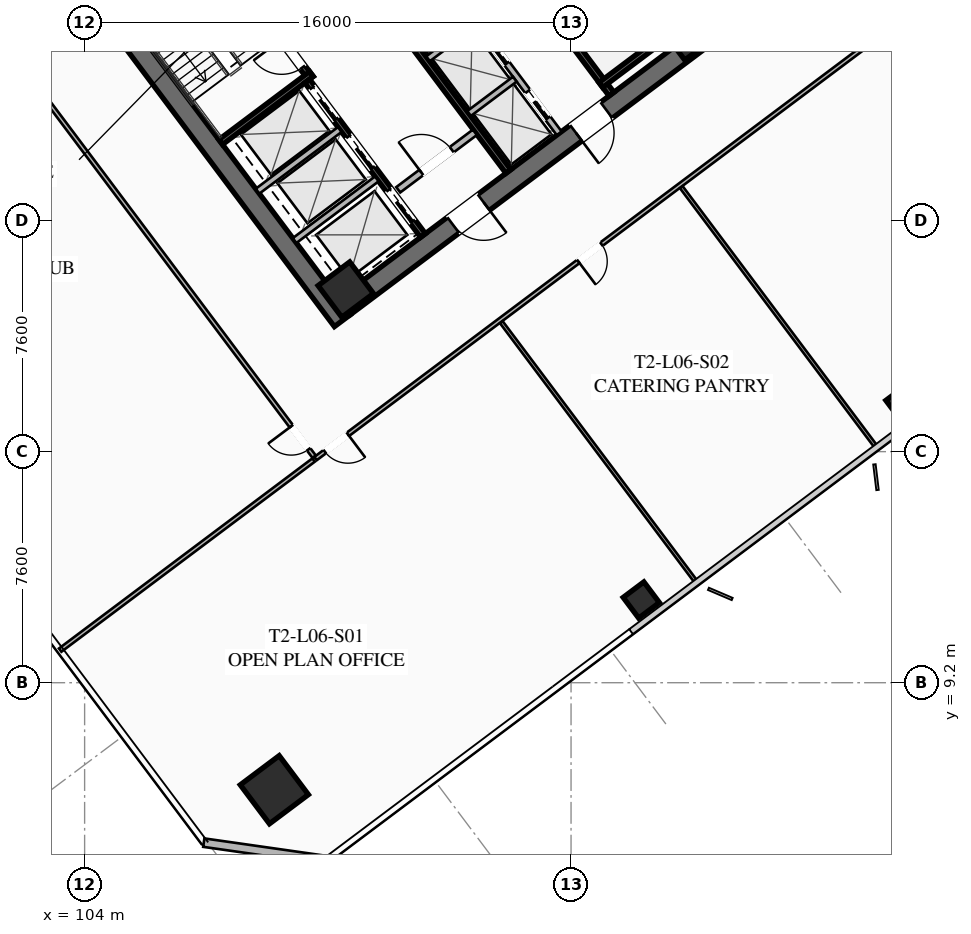
"""IFC4 building model, lengths in metres.
Left out: names, types, materials, properties, quantities, classifications, styles, units other than length and angle.
Written with IfcOpenShell. Run it as: python <this file> out.ifc"""

import sys

from ifc_helpers import new_model, si_unit, direction, frame, frame_2d, origin, origin_2d, place, context, subcontext, project, spatial, rectangle, hollow_rectangle, extrude, element, fill, save


model = new_model("IFC4")
c1 = context("Model", 3, precision=1e-05, world=origin(), true_north=direction((0.0, 1.0)))
c2 = subcontext(c1, "Body", "Model", "MODEL_VIEW")
j1 = project(units=[si_unit("LENGTHUNIT", "METRE"), si_unit("PLANEANGLEUNIT", "RADIAN")], contexts=[c1])
p1 = place(None, origin())
s1 = spatial("IfcSite", under=j1, at=p1, CompositionType="ELEMENT")
p2 = place(p1, origin())
s2 = spatial("IfcBuilding", under=s1, at=p2, CompositionType="ELEMENT")
p3 = place(p2, frame((0.0, 0.0, 28.15)))
s3 = spatial("IfcBuildingStorey", under=s2, at=p3, CompositionType="ELEMENT", Elevation=28.15)
p4 = place(p3, frame((112.476, 21.107, 0.0), z_axis=(0.0, 0.0, 1.0), x_axis=(-0.600005007985, 0.799996243986, 0.0)))
e1 = element("IfcWall", 1, at=p4, inside=s3, PredefinedType="SHEAR", context=c2, shape_type="SweptSolid", body=[
    extrude(rectangle(XDim=15.6, YDim=0.65, at=frame_2d((7.8, 0.0))), origin(), (0.0, 0.0, 1.0), 3.55),
])
p5 = place(p3, frame((124.429, 30.478, 0.0), z_axis=(0.0, 0.0, 1.0), x_axis=(-0.799998028465, -0.600002628705, 0.0)))
e2 = element("IfcWall", 2, at=p5, inside=s3, PredefinedType="SHEAR", context=c2, shape_type="SweptSolid", body=[
    extrude(rectangle(XDim=14.86, YDim=0.65, at=frame_2d((7.43, 0.0))), origin(), (0.0, 0.0, 1.0), 3.55),
])
p6 = place(p5, frame((9.13, 0.0, 0.0)))
e3 = element("IfcOpeningElement", 3, at=p6, cuts=e2, PredefinedType="OPENING", context=c2, shape_type="SweptSolid", body=[
    extrude(rectangle(XDim=1.25, YDim=2.25, at=frame_2d((0.625, 1.125))), frame((0.0, 0.335, 0.0), z_axis=(0.0, -1.0, 0.0), x_axis=(1.0, 0.0, 0.0)), (0.0, 0.0, 1.0), 0.67),
])
p7 = place(p5, frame((4.08, 0.0, 0.0)))
e4 = element("IfcOpeningElement", 4, at=p7, cuts=e2, PredefinedType="OPENING", context=c2, shape_type="SweptSolid", body=[
    extrude(rectangle(XDim=1.25, YDim=2.25, at=frame_2d((0.625, 1.125))), frame((0.0, 0.335, 0.0), z_axis=(0.0, -1.0, 0.0), x_axis=(1.0, 0.0, 0.0)), (0.0, 0.0, 1.0), 0.67),
])
for number, where, z_axis, x_axis in (
    (5, (112.59, 22.13, 0.0), (0.0, 0.0, 1.0), (0.8, 0.6, 0.0)),
    (6, (123.87, 30.59, 0.0), (0.0, 0.0, 1.0), (0.8, 0.6, 0.0)),
):
    element("IfcColumn", number, at=place(p3, frame(where, z_axis=z_axis, x_axis=x_axis)), inside=s3, PredefinedType="COLUMN", context=c2, shape_type="SweptSolid", body=[
        extrude(hollow_rectangle(XDim=1.3, YDim=1.3, WallThickness=0.05, at=origin_2d()), origin(), (0.0, 0.0, 1.0), 3.35),
    ])
p8 = place(p3, frame((110.24, 5.68, 0.0), z_axis=(0.0, 0.0, 1.0), x_axis=(0.799999996291, 0.600000004945, 0.0)))
e7 = element("IfcColumn", 7, at=p8, inside=s3, PredefinedType="COLUMN", context=c2, shape_type="SweptSolid", body=[
    extrude(hollow_rectangle(XDim=1.6, YDim=1.6, WallThickness=0.06, at=origin_2d()), origin(), (0.0, 0.0, 1.0), 3.35),
])
for number, where, z_axis, x_axis in (
    (8, (122.31, 11.92, 0.0), (0.0, 0.0, 1.0), (0.8, 0.6, 0.0)),
    (9, (130.95, 18.4, 0.0), (0.0, 0.0, 1.0), (0.8, 0.6, 0.0)),
):
    element("IfcColumn", number, at=place(p3, frame(where, z_axis=z_axis, x_axis=x_axis)), inside=s3, PredefinedType="COLUMN", context=c2, shape_type="SweptSolid", body=[
        extrude(hollow_rectangle(XDim=0.85, YDim=0.85, WallThickness=0.035, at=origin_2d()), origin(), (0.0, 0.0, 1.0), 3.35),
    ])
p9 = place(p3, frame((111.98, 3.36, 0.0), z_axis=(0.0, 0.0, 1.0), x_axis=(-0.989955445613, 0.14137968631, 0.0)))
e10 = element("IfcWall", 10, at=p9, inside=s3, PredefinedType="SOLIDWALL", context=c2, shape_type="SweptSolid", body=[
    extrude(rectangle(XDim=4.101, YDim=0.28, at=frame_2d((2.051, 0.0))), origin(), (0.0, 0.0, 1.0), 3.35),
])
p10 = place(p3, frame((111.44, 29.08, 0.0), z_axis=(0.0, 0.0, 1.0), x_axis=(-0.600009827119, 0.799992629566, 0.0)))
e11 = element("IfcWall", 11, at=p10, inside=s3, PredefinedType="SHEAR", context=c2, shape_type="SweptSolid", body=[
    extrude(rectangle(XDim=7.95, YDim=0.2, at=frame_2d((3.975, 0.0))), origin(), (0.0, 0.0, 1.0), 3.35),
])
p11 = place(p10, frame((0.45, 0.0, 0.0)))
e12 = element("IfcOpeningElement", 12, at=p11, cuts=e11, PredefinedType="OPENING", context=c2, shape_type="SweptSolid", body=[
    extrude(rectangle(XDim=1.15, YDim=2.2, at=frame_2d((0.575, 1.1))), frame((0.0, 0.11, 0.0), z_axis=(0.0, -1.0, 0.0), x_axis=(1.0, 0.0, 0.0)), (0.0, 0.0, 1.0), 0.22),
])
p12 = place(p3, frame((108.476, 26.982, 0.0), z_axis=(0.0, 0.0, 1.0), x_axis=(0.799984290658, 0.600020945218, 0.0)))
e13 = element("IfcWall", 13, at=p12, inside=s3, PredefinedType="SHEAR", context=c2, shape_type="SweptSolid", body=[
    extrude(rectangle(XDim=3.73, YDim=0.2, at=frame_2d((1.865, 0.0))), origin(), (0.0, 0.0, 1.0), 3.35),
])
p13 = place(p3, frame((116.56, 34.92, 0.0), z_axis=(0.0, 0.0, 1.0), x_axis=(0.600009827119, -0.799992629566, 0.0)))
e14 = element("IfcWall", 14, at=p13, inside=s3, PredefinedType="SHEAR", context=c2, shape_type="SweptSolid", body=[
    extrude(rectangle(XDim=7.95, YDim=0.2, at=frame_2d((3.975, 0.0))), origin(), (0.0, 0.0, 1.0), 3.35),
])
p14 = place(p13, frame((0.45, 0.0, 0.0)))
e15 = element("IfcOpeningElement", 15, at=p14, cuts=e14, PredefinedType="OPENING", context=c2, shape_type="SweptSolid", body=[
    extrude(rectangle(XDim=1.15, YDim=2.2, at=frame_2d((0.575, 1.1))), frame((0.0, 0.11, 0.0), z_axis=(0.0, -1.0, 0.0), x_axis=(1.0, 0.0, 0.0)), (0.0, 0.0, 1.0), 0.22),
])
p15 = place(p3, frame((120.98, 28.86, 0.0), z_axis=(0.0, 0.0, 1.0), x_axis=(0.800039270442, 0.59994763584, 0.0)))
e16 = element("IfcWall", 16, at=p15, inside=s3, PredefinedType="SHEAR", context=c2, shape_type="SweptSolid", body=[
    extrude(rectangle(XDim=3.73, YDim=0.2, at=frame_2d((1.865, 0.0))), origin(), (0.0, 0.0, 1.0), 3.35),
])
p16 = place(p3, frame((117.938, 26.016, 0.0), z_axis=(0.0, 0.0, 1.0), x_axis=(-0.600005463273, 0.799995902516, 0.0)))
e17 = element("IfcWall", 17, at=p16, inside=s3, PredefinedType="SHEAR", context=c2, shape_type="SweptSolid", body=[
    extrude(rectangle(XDim=14.3, YDim=0.2, at=frame_2d((7.15, 0.0))), origin(), (0.0, 0.0, 1.0), 3.35),
])
p17 = place(p3, frame((114.316, 25.412, 0.0), z_axis=(0.0, 0.0, 1.0), x_axis=(0.800018601094, 0.59997519774, 0.0)))
e18 = element("IfcWall", 18, at=p17, inside=s3, PredefinedType="SOLIDWALL", context=c2, shape_type="SweptSolid", body=[
    extrude(rectangle(XDim=3.15, YDim=0.22, at=frame_2d((1.575, 0.0))), origin(), (0.0, 0.0, 1.0), 2.703),
])
p18 = place(p17, frame((0.95, 0.0, 0.0)))
e19 = element("IfcOpeningElement", 19, at=p18, cuts=e18, PredefinedType="OPENING", context=c2, shape_type="SweptSolid", body=[
    extrude(rectangle(XDim=1.25, YDim=2.25, at=frame_2d((0.625, 1.125))), frame((0.0, 0.12, 0.0), z_axis=(0.0, -1.0, 0.0), x_axis=(1.0, 0.0, 0.0)), (0.0, 0.0, 1.0), 0.24),
])
p19 = place(p3, frame((115.13, 23.91, 0.0), z_axis=(0.0, 0.0, 1.0), x_axis=(-0.599975393228, 0.800018454488, 0.0)))
e20 = element("IfcWall", 20, at=p19, inside=s3, PredefinedType="SHEAR", context=c2, shape_type="SweptSolid", body=[
    extrude(rectangle(XDim=6.35, YDim=0.2, at=frame_2d((3.175, 0.0))), origin(), (0.0, 0.0, 1.0), 3.35),
])
p20 = place(p19, frame((4.775, 0.0, 0.0)))
e21 = element("IfcOpeningElement", 21, at=p20, cuts=e20, PredefinedType="OPENING", context=c2, shape_type="SweptSolid", body=[
    extrude(rectangle(XDim=1.3, YDim=2.25, at=frame_2d((0.65, 1.125))), frame((0.0, 0.11, 0.0), z_axis=(0.0, -1.0, 0.0), x_axis=(1.0, 0.0, 0.0)), (0.0, 0.0, 1.0), 0.22),
])
p21 = place(p19, frame((2.775, 0.0, 0.0)))
e22 = element("IfcOpeningElement", 22, at=p21, cuts=e20, PredefinedType="OPENING", context=c2, shape_type="SweptSolid", body=[
    extrude(rectangle(XDim=1.3, YDim=2.25, at=frame_2d((0.65, 1.125))), frame((0.0, 0.11, 0.0), z_axis=(0.0, -1.0, 0.0), x_axis=(1.0, 0.0, 0.0)), (0.0, 0.0, 1.0), 0.22),
])
p22 = place(p19, frame((0.575, 0.0, 0.0)))
e23 = element("IfcOpeningElement", 23, at=p22, cuts=e20, PredefinedType="OPENING", context=c2, shape_type="SweptSolid", body=[
    extrude(rectangle(XDim=1.3, YDim=2.25, at=frame_2d((0.65, 1.125))), frame((0.0, 0.11, 0.0), z_axis=(0.0, -1.0, 0.0), x_axis=(1.0, 0.0, 0.0)), (0.0, 0.0, 1.0), 0.22),
])
for number, where, z_axis, x_axis in (
    (24, (110.906, 23.742, 0.0), (0.0, 0.0, 1.0), (0.8, 0.6, 0.0)),
    (25, (109.688, 25.366, 0.0), (0.0, 0.0, 1.0), (0.8, 0.6, 0.0)),
):
    element("IfcWall", number, at=place(p3, frame(where, z_axis=z_axis, x_axis=x_axis)), inside=s3, PredefinedType="SOLIDWALL", context=c2, shape_type="SweptSolid", body=[
        extrude(rectangle(XDim=3.38, YDim=0.2, at=frame_2d((1.69, 0.0))), origin(), (0.0, 0.0, 1.0), 3.35),
    ])
p23 = place(p3, frame((119.61, 27.27, 0.0), z_axis=(0.0, 0.0, 1.0), x_axis=(-0.600011488909, 0.79999138319, 0.0)))
e26 = element("IfcWall", 26, at=p23, inside=s3, PredefinedType="SOLIDWALL", context=c2, shape_type="SweptSolid", body=[
    extrude(rectangle(XDim=6.8, YDim=0.2, at=frame_2d((3.4, 0.0))), origin(), (0.0, 0.0, 1.0), 3.35),
])
p24 = place(p23, frame((0.625, 0.0, 0.0)))
e27 = element("IfcOpeningElement", 27, at=p24, cuts=e26, PredefinedType="OPENING", context=c2, shape_type="SweptSolid", body=[
    extrude(rectangle(XDim=1.1, YDim=2.2, at=frame_2d((0.55, 1.1))), frame((0.0, 0.11, 0.0), z_axis=(0.0, -1.0, 0.0), x_axis=(1.0, 0.0, 0.0)), (0.0, 0.0, 1.0), 0.22),
])
p25 = place(p23, frame((2.875, 0.0, 0.0)))
e28 = element("IfcOpeningElement", 28, at=p25, cuts=e26, PredefinedType="OPENING", context=c2, shape_type="SweptSolid", body=[
    extrude(rectangle(XDim=1.1, YDim=2.2, at=frame_2d((0.55, 1.1))), frame((0.0, 0.11, 0.0), z_axis=(0.0, -1.0, 0.0), x_axis=(1.0, 0.0, 0.0)), (0.0, 0.0, 1.0), 0.22),
])
p26 = place(p23, frame((5.125, 0.0, 0.0)))
e29 = element("IfcOpeningElement", 29, at=p26, cuts=e26, PredefinedType="OPENING", context=c2, shape_type="SweptSolid", body=[
    extrude(rectangle(XDim=1.1, YDim=2.2, at=frame_2d((0.55, 1.1))), frame((0.0, 0.11, 0.0), z_axis=(0.0, -1.0, 0.0), x_axis=(1.0, 0.0, 0.0)), (0.0, 0.0, 1.0), 0.22),
])
p27 = place(p3, frame((116.646, 27.922, 0.0), z_axis=(0.0, 0.0, 1.0), x_axis=(0.8, 0.6, 0.0)))
e30 = element("IfcWall", 30, at=p27, inside=s3, PredefinedType="SOLIDWALL", context=c2, shape_type="SweptSolid", body=[
    extrude(rectangle(XDim=1.88, YDim=0.2, at=frame_2d((0.94, 0.0))), origin(), (0.0, 0.0, 1.0), 3.35),
])
p28 = place(p3, frame((115.296, 29.722, 0.0), z_axis=(0.0, 0.0, 1.0), x_axis=(0.799984418148, 0.600020775241, 0.0)))
e31 = element("IfcWall", 31, at=p28, inside=s3, PredefinedType="SOLIDWALL", context=c2, shape_type="SweptSolid", body=[
    extrude(rectangle(XDim=1.88, YDim=0.2, at=frame_2d((0.94, 0.0))), origin(), (0.0, 0.0, 1.0), 3.35),
])
p29 = place(p3, frame((135.46, 34.47, 0.0), z_axis=(0.0, 0.0, 1.0), x_axis=(-0.800000982127, -0.599998690494, 0.0)))
e32 = element("IfcWall", 32, at=p29, inside=s3, PredefinedType="PARTITIONING", context=c2, shape_type="SweptSolid", body=[
    extrude(rectangle(XDim=29.83, YDim=0.135, at=frame_2d((14.915, 0.0))), origin(), (0.0, 0.0, 1.0), 2.703),
])
p30 = place(p29, frame((28.5, 0.0, 0.0)))
e33 = element("IfcOpeningElement", 33, at=p30, cuts=e32, PredefinedType="OPENING", context=c2, shape_type="SweptSolid", body=[
    extrude(rectangle(XDim=0.95, YDim=2.05, at=frame_2d((0.475, 1.025))), frame((0.0, 0.077, 0.0), z_axis=(0.0, -1.0, 0.0), x_axis=(1.0, 0.0, 0.0)), (0.0, 0.0, 1.0), 0.155),
])
p31 = place(p29, frame((18.075, 0.0, 0.0)))
e34 = element("IfcOpeningElement", 34, at=p31, cuts=e32, PredefinedType="OPENING", context=c2, shape_type="SweptSolid", body=[
    extrude(rectangle(XDim=0.95, YDim=2.05, at=frame_2d((0.475, 1.025))), frame((0.0, 0.077, 0.0), z_axis=(0.0, -1.0, 0.0), x_axis=(1.0, 0.0, 0.0)), (0.0, 0.0, 1.0), 0.155),
])
p32 = place(p29, frame((0.38, 0.0, 0.0)))
e35 = element("IfcOpeningElement", 35, at=p32, cuts=e32, PredefinedType="OPENING", context=c2, shape_type="SweptSolid", body=[
    extrude(rectangle(XDim=0.95, YDim=2.05, at=frame_2d((0.475, 1.025))), frame((0.0, 0.077, 0.0), z_axis=(0.0, -1.0, 0.0), x_axis=(1.0, 0.0, 0.0)), (0.0, 0.0, 1.0), 0.155),
])
p33 = place(p3, frame((124.128, 12.496, 0.0), z_axis=(0.0, 0.0, 1.0), x_axis=(-0.600003650761, 0.799997261916, 0.0)))
e36 = element("IfcWall", 36, at=p33, inside=s3, PredefinedType="PARTITIONING", context=c2, shape_type="SweptSolid", body=[
    extrude(rectangle(XDim=10.7, YDim=0.11, at=frame_2d((5.35, 0.0))), origin(), (0.0, 0.0, 1.0), 2.703),
])
p34 = place(p3, frame((130.048, 16.936, 0.0), z_axis=(0.0, 0.0, 1.0), x_axis=(-0.600007301277, 0.79999452399, 0.0)))
e37 = element("IfcWall", 37, at=p34, inside=s3, PredefinedType="PARTITIONING", context=c2, shape_type="SweptSolid", body=[
    extrude(rectangle(XDim=10.7, YDim=0.11, at=frame_2d((5.35, 0.0))), origin(), (0.0, 0.0, 1.0), 2.703),
])
p35 = place(p3, frame((111.548, 16.636, 0.0), z_axis=(0.0, 0.0, 1.0), x_axis=(-0.600003610192, 0.799997292343, 0.0)))
e38 = element("IfcWall", 38, at=p35, inside=s3, PredefinedType="PARTITIONING", context=c2, shape_type="SweptSolid", body=[
    extrude(rectangle(XDim=21.64, YDim=0.135, at=frame_2d((10.82, 0.0))), origin(), (0.0, 0.0, 1.0), 2.703),
])
p36 = place(p35, frame((0.3, 0.0, 0.0)))
e39 = element("IfcOpeningElement", 39, at=p36, cuts=e38, PredefinedType="OPENING", context=c2, shape_type="SweptSolid", body=[
    extrude(rectangle(XDim=0.95, YDim=2.05, at=frame_2d((0.475, 1.025))), frame((0.0, 0.077, 0.0), z_axis=(0.0, -1.0, 0.0), x_axis=(1.0, 0.0, 0.0)), (0.0, 0.0, 1.0), 0.155),
])
p37 = place(p3, frame((103.196, 10.272, 0.0), z_axis=(0.0, 0.0, 1.0), x_axis=(0.8, 0.6, 0.0)))
e40 = element("IfcWall", 40, at=p37, inside=s3, PredefinedType="PARTITIONING", context=c2, shape_type="SweptSolid", body=[
    extrude(rectangle(XDim=10.42, YDim=0.135, at=frame_2d((5.21, 0.0))), origin(), (0.0, 0.0, 1.0), 2.703),
])
p38 = place(p6, origin())
e41 = element("IfcDoor", 41, at=p38, inside=s3, OperationType="SINGLE_SWING_LEFT", PredefinedType="DOOR", context=c2, shape_type="SweptSolid", body=[
    extrude(rectangle(XDim=1.25, YDim=2.25, at=frame_2d((0.625, 1.125))), frame((0.0, 0.025, 0.0), z_axis=(0.0, -1.0, 0.0), x_axis=(1.0, 0.0, 0.0)), (0.0, 0.0, 1.0), 0.05),
])
fill(e3, e41)
p39 = place(p7, origin())
e42 = element("IfcDoor", 42, at=p39, inside=s3, OperationType="SINGLE_SWING_RIGHT", PredefinedType="DOOR", context=c2, shape_type="SweptSolid", body=[
    extrude(rectangle(XDim=1.25, YDim=2.25, at=frame_2d((0.625, 1.125))), frame((0.0, 0.025, 0.0), z_axis=(0.0, -1.0, 0.0), x_axis=(1.0, 0.0, 0.0)), (0.0, 0.0, 1.0), 0.05),
])
fill(e4, e42)
p40 = place(p11, origin())
e43 = element("IfcDoor", 43, at=p40, inside=s3, OperationType="SINGLE_SWING_RIGHT", PredefinedType="DOOR", context=c2, shape_type="SweptSolid", body=[
    extrude(rectangle(XDim=1.15, YDim=2.2, at=frame_2d((0.575, 1.1))), frame((0.0, 0.025, 0.0), z_axis=(0.0, -1.0, 0.0), x_axis=(1.0, 0.0, 0.0)), (0.0, 0.0, 1.0), 0.05),
])
fill(e12, e43)
p41 = place(p18, origin())
e44 = element("IfcDoor", 44, at=p41, inside=s3, OperationType="SINGLE_SWING_LEFT", PredefinedType="DOOR", context=c2, shape_type="SweptSolid", body=[
    extrude(rectangle(XDim=1.25, YDim=2.25, at=frame_2d((0.625, 1.125))), frame((0.0, 0.025, 0.0), z_axis=(0.0, -1.0, 0.0), x_axis=(1.0, 0.0, 0.0)), (0.0, 0.0, 1.0), 0.05),
])
fill(e19, e44)
p42 = place(p30, origin())
e45 = element("IfcDoor", 45, at=p42, inside=s3, OperationType="SINGLE_SWING_LEFT", PredefinedType="DOOR", context=c2, shape_type="SweptSolid", body=[
    extrude(rectangle(XDim=0.95, YDim=2.05, at=frame_2d((0.475, 1.025))), frame((0.0, 0.025, 0.0), z_axis=(0.0, -1.0, 0.0), x_axis=(1.0, 0.0, 0.0)), (0.0, 0.0, 1.0), 0.05),
])
fill(e33, e45)
p43 = place(p31, origin())
e46 = element("IfcDoor", 46, at=p43, inside=s3, OperationType="SINGLE_SWING_RIGHT", PredefinedType="DOOR", context=c2, shape_type="SweptSolid", body=[
    extrude(rectangle(XDim=0.95, YDim=2.05, at=frame_2d((0.475, 1.025))), frame((0.0, 0.025, 0.0), z_axis=(0.0, -1.0, 0.0), x_axis=(1.0, 0.0, 0.0)), (0.0, 0.0, 1.0), 0.05),
])
fill(e34, e46)
p44 = place(p36, origin())
e47 = element("IfcDoor", 47, at=p44, inside=s3, OperationType="SINGLE_SWING_RIGHT", PredefinedType="DOOR", context=c2, shape_type="SweptSolid", body=[
    extrude(rectangle(XDim=0.95, YDim=2.05, at=frame_2d((0.475, 1.025))), frame((0.0, 0.025, 0.0), z_axis=(0.0, -1.0, 0.0), x_axis=(1.0, 0.0, 0.0)), (0.0, 0.0, 1.0), 0.05),
])
fill(e39, e47)
p45 = place(p20, origin())
e48 = element("IfcDoor", 48, at=p45, inside=s3, OperationType="SLIDING_TO_LEFT", PredefinedType="DOOR", context=c2, shape_type="SweptSolid", body=[
    extrude(rectangle(XDim=1.3, YDim=2.25, at=frame_2d((0.65, 1.125))), frame((0.0, 0.025, 0.0), z_axis=(0.0, -1.0, 0.0), x_axis=(1.0, 0.0, 0.0)), (0.0, 0.0, 1.0), 0.05),
])
fill(e21, e48)
p46 = place(p21, origin())
e49 = element("IfcDoor", 49, at=p46, inside=s3, OperationType="SLIDING_TO_LEFT", PredefinedType="DOOR", context=c2, shape_type="SweptSolid", body=[
    extrude(rectangle(XDim=1.3, YDim=2.25, at=frame_2d((0.65, 1.125))), frame((0.0, 0.025, 0.0), z_axis=(0.0, -1.0, 0.0), x_axis=(1.0, 0.0, 0.0)), (0.0, 0.0, 1.0), 0.05),
])
fill(e22, e49)
p47 = place(p22, origin())
e50 = element("IfcDoor", 50, at=p47, inside=s3, OperationType="SLIDING_TO_LEFT", PredefinedType="DOOR", context=c2, shape_type="SweptSolid", body=[
    extrude(rectangle(XDim=1.3, YDim=2.25, at=frame_2d((0.65, 1.125))), frame((0.0, 0.025, 0.0), z_axis=(0.0, -1.0, 0.0), x_axis=(1.0, 0.0, 0.0)), (0.0, 0.0, 1.0), 0.05),
])
fill(e23, e50)
p48 = place(p24, origin())
e51 = element("IfcDoor", 51, at=p48, inside=s3, OperationType="SLIDING_TO_LEFT", PredefinedType="DOOR", context=c2, shape_type="SweptSolid", body=[
    extrude(rectangle(XDim=1.1, YDim=2.2, at=frame_2d((0.55, 1.1))), frame((0.0, 0.025, 0.0), z_axis=(0.0, -1.0, 0.0), x_axis=(1.0, 0.0, 0.0)), (0.0, 0.0, 1.0), 0.05),
])
fill(e27, e51)
p49 = place(p25, origin())
e52 = element("IfcDoor", 52, at=p49, inside=s3, OperationType="SLIDING_TO_LEFT", PredefinedType="DOOR", context=c2, shape_type="SweptSolid", body=[
    extrude(rectangle(XDim=1.1, YDim=2.2, at=frame_2d((0.55, 1.1))), frame((0.0, 0.025, 0.0), z_axis=(0.0, -1.0, 0.0), x_axis=(1.0, 0.0, 0.0)), (0.0, 0.0, 1.0), 0.05),
])
fill(e28, e52)
save(model, sys.argv[1])
